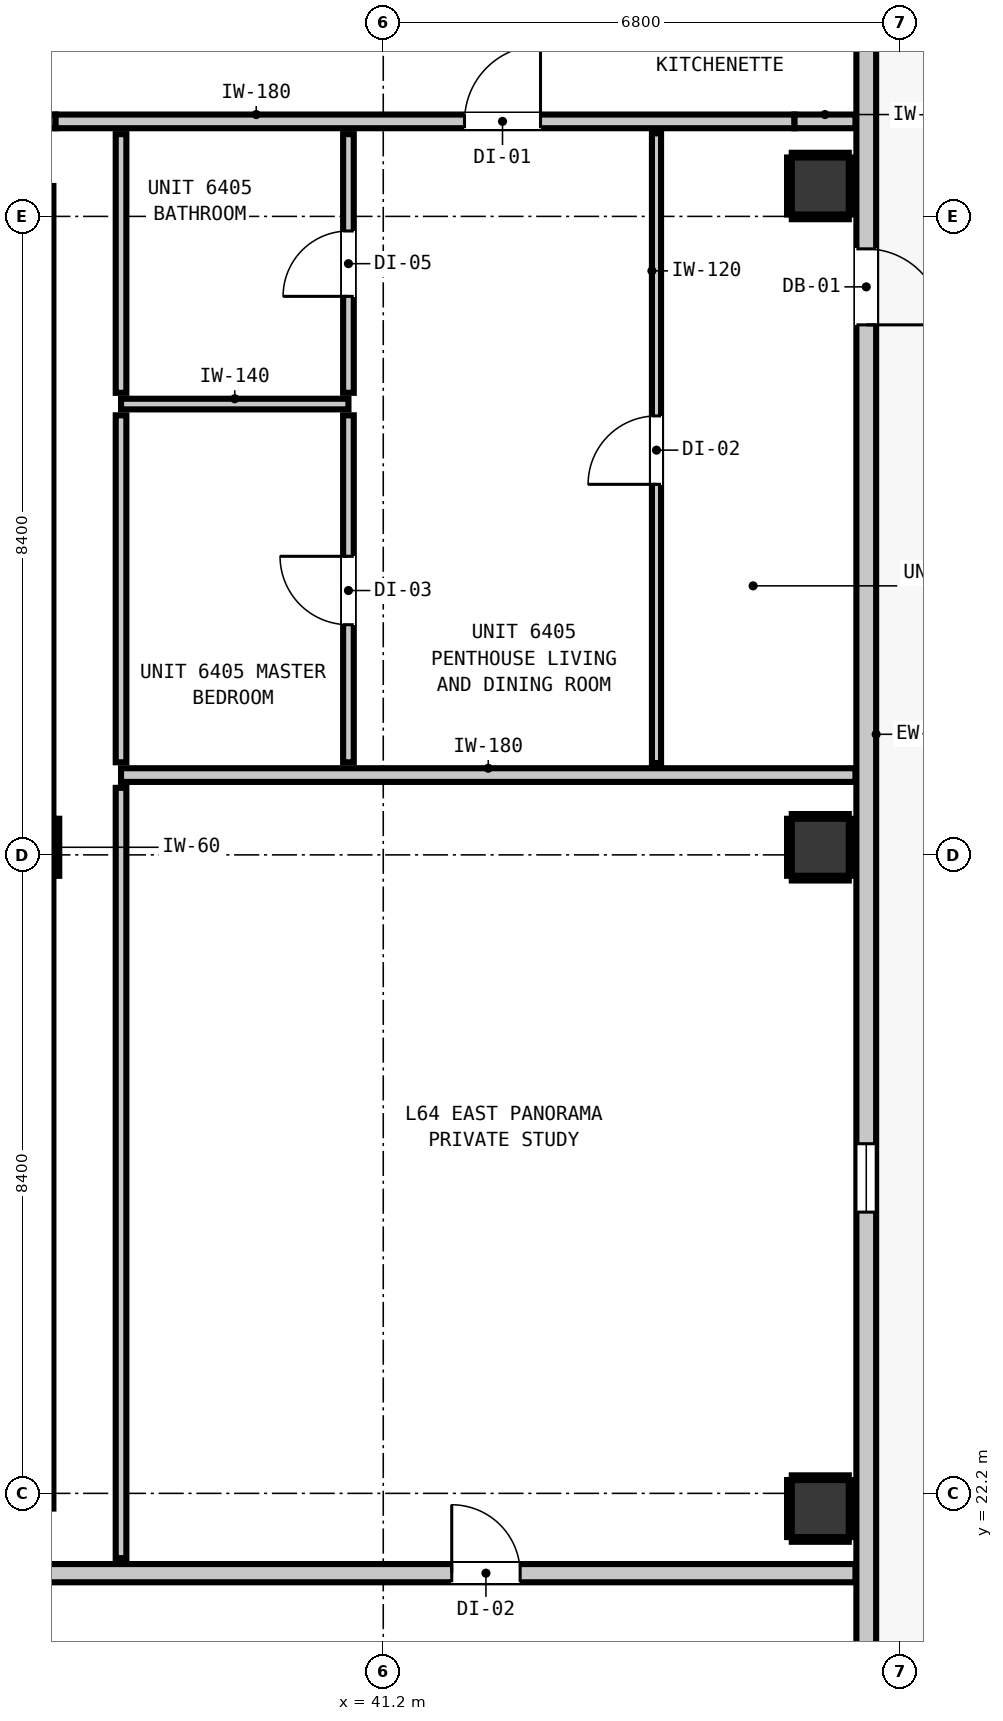
"""IFC4 building model, lengths in metres.
Left out: names, types, materials, properties, quantities, classifications, styles, units other than length and angle.
Written with IfcOpenShell. Run it as: python <this file> out.ifc"""

import sys

from ifc_helpers import new_model, si_unit, direction, frame, frame_2d, origin, origin_2d, place, context, subcontext, project, spatial, rectangle, extrude, element, fill, save


model = new_model("IFC4")
c1 = context("Model", 3, precision=1e-05, world=origin(), true_north=direction((0.0, 1.0)))
c2 = subcontext(c1, "Body", "Model", "MODEL_VIEW")
j1 = project(units=[si_unit("LENGTHUNIT", "METRE"), si_unit("PLANEANGLEUNIT", "RADIAN")], contexts=[c1])
p1 = place(None, origin())
s1 = spatial("IfcSite", under=j1, at=p1, CompositionType="ELEMENT")
p2 = place(p1, origin())
s2 = spatial("IfcBuilding", under=s1, at=p2, CompositionType="ELEMENT")
p3 = place(p2, frame((0.0, 0.0, 220.04)))
s3 = spatial("IfcBuildingStorey", under=s2, at=p3, CompositionType="ELEMENT", Elevation=220.04)
p4 = place(p3, frame((36.5, 30.7, 0.0), z_axis=(0.0, 0.0, 1.0), x_axis=(1.0, 0.0, 0.0)))
e1 = element("IfcColumn", 1, at=p4, inside=s3, PredefinedType="COLUMN", context=c2, shape_type="SweptSolid", body=[
    extrude(rectangle(XDim=0.75, YDim=0.75, at=origin_2d()), origin(), (0.0, 0.0, 1.0), 3.32),
])
p5 = place(p3, frame((36.46, 22.0, 0.0), z_axis=(0.0, 0.0, 1.0), x_axis=(0.0, 1.0, 0.0)))
e2 = element("IfcWall", 2, at=p5, inside=s3, PredefinedType="SHEAR", context=c2, shape_type="SweptSolid", body=[
    extrude(rectangle(XDim=8.32, YDim=0.8, at=frame_2d((4.16, 0.0))), origin(), (0.0, 0.0, 1.0), 3.32),
])
p6 = place(p3, frame((36.46, 31.08, 0.0), z_axis=(0.0, 0.0, 1.0), x_axis=(0.0, 1.0, 0.0)))
e3 = element("IfcWall", 3, at=p6, inside=s3, PredefinedType="SHEAR", context=c2, shape_type="SweptSolid", body=[
    extrude(rectangle(XDim=8.32, YDim=0.8, at=frame_2d((4.16, 0.0))), origin(), (0.0, 0.0, 1.0), 3.32),
])
for number, where, z_axis, x_axis in (
    (4, (46.95, 22.0, 0.0), (0.0, 0.0, 1.0), (1.0, 0.0, 0.0)),
    (5, (46.95, 30.7, 0.0), (0.0, 0.0, 1.0), (1.0, 0.0, 0.0)),
    (6, (46.95, 39.4, 0.0), (0.0, 0.0, 1.0), (1.0, 0.0, 0.0)),
):
    element("IfcColumn", number, at=place(p3, frame(where, z_axis=z_axis, x_axis=x_axis)), inside=s3, PredefinedType="COLUMN", context=c2, shape_type="SweptSolid", body=[
        extrude(rectangle(XDim=0.75, YDim=0.75, at=origin_2d()), origin(), (0.0, 0.0, 1.0), 3.32),
    ])
p7 = place(p3, frame((47.555, 42.655, 0.0), z_axis=(0.0, 0.0, 1.0), x_axis=(0.0, -1.0, 0.0)))
e7 = element("IfcWall", 7, at=p7, inside=s3, PredefinedType="STANDARD", context=c2, shape_type="SweptSolid", body=[
    extrude(rectangle(XDim=30.31, YDim=0.26, at=frame_2d((15.155, 0.0))), origin(), (0.0, 0.0, 1.0), 3.1),
])
p8 = place(p7, frame((4.082, 0.0, 0.0)))
e8 = element("IfcOpeningElement", 8, at=p8, cuts=e7, PredefinedType="OPENING", context=c2, shape_type="SweptSolid", body=[
    extrude(rectangle(XDim=1.0, YDim=2.15, at=frame_2d((0.5, 1.075))), frame((0.0, 0.14, 0.0), z_axis=(0.0, -1.0, 0.0), x_axis=(1.0, 0.0, 0.0)), (0.0, 0.0, 1.0), 0.28),
])
p9 = place(p7, frame((24.701, 0.0, 0.85)))
e9 = element("IfcOpeningElement", 9, at=p9, cuts=e7, PredefinedType="OPENING", context=c2, shape_type="SweptSolid", body=[
    extrude(rectangle(XDim=0.9, YDim=1.5, at=frame_2d((0.45, 0.75))), frame((0.0, 0.14, 0.0), z_axis=(0.0, -1.0, 0.0), x_axis=(1.0, 0.0, 0.0)), (0.0, 0.0, 1.0), 0.28),
])
p10 = place(p7, frame((28.258, 0.0, 0.85)))
e10 = element("IfcOpeningElement", 10, at=p10, cuts=e7, PredefinedType="OPENING", context=c2, shape_type="SweptSolid", body=[
    extrude(rectangle(XDim=0.9, YDim=1.5, at=frame_2d((0.45, 0.75))), frame((0.0, 0.14, 0.0), z_axis=(0.0, -1.0, 0.0), x_axis=(1.0, 0.0, 0.0)), (0.0, 0.0, 1.0), 0.28),
])
p11 = place(p7, frame((15.855, 0.0, 0.85)))
e11 = element("IfcOpeningElement", 11, at=p11, cuts=e7, PredefinedType="OPENING", context=c2, shape_type="SweptSolid", body=[
    extrude(rectangle(XDim=0.9, YDim=1.5, at=frame_2d((0.45, 0.75))), frame((0.0, 0.14, 0.0), z_axis=(0.0, -1.0, 0.0), x_axis=(1.0, 0.0, 0.0)), (0.0, 0.0, 1.0), 0.28),
])
p12 = place(p3, frame((10.787, 21.15, 0.0), z_axis=(0.0, 0.0, 1.0), x_axis=(1.0, 0.0, 0.0)))
e12 = element("IfcWall", 12, at=p12, inside=s3, PredefinedType="PARTITIONING", context=c2, shape_type="SweptSolid", body=[
    extrude(rectangle(XDim=36.626, YDim=0.24, at=frame_2d((18.313, 0.0))), origin(), (0.0, 0.0, 1.0), 3.1),
])
p13 = place(p12, frame((7.423, 0.0, 0.0)))
e13 = element("IfcOpeningElement", 13, at=p13, cuts=e12, PredefinedType="OPENING", context=c2, shape_type="SweptSolid", body=[
    extrude(rectangle(XDim=1.1, YDim=2.15, at=frame_2d((0.55, 1.075))), frame((0.0, 0.13, 0.0), z_axis=(0.0, -1.0, 0.0), x_axis=(1.0, 0.0, 0.0)), (0.0, 0.0, 1.0), 0.26),
])
p14 = place(p12, frame((31.314, 0.0, 0.0)))
e14 = element("IfcOpeningElement", 14, at=p14, cuts=e12, PredefinedType="OPENING", context=c2, shape_type="SweptSolid", body=[
    extrude(rectangle(XDim=0.9, YDim=2.1, at=frame_2d((0.45, 1.05))), frame((0.0, 0.13, 0.0), z_axis=(0.0, -1.0, 0.0), x_axis=(1.0, 0.0, 0.0)), (0.0, 0.0, 1.0), 0.26),
])
p15 = place(p3, frame((37.75, 31.65, 0.0), z_axis=(0.0, 0.0, 1.0), x_axis=(1.0, 0.0, 0.0)))
e15 = element("IfcWall", 15, at=p15, inside=s3, PredefinedType="PARTITIONING", context=c2, shape_type="SweptSolid", body=[
    extrude(rectangle(XDim=9.663, YDim=0.18, at=frame_2d((4.832, 0.0))), origin(), (0.0, 0.0, 1.0), 3.1),
])
p16 = place(p3, frame((10.787, 40.25, 0.0), z_axis=(0.0, 0.0, 1.0), x_axis=(1.0, 0.0, 0.0)))
e16 = element("IfcWall", 16, at=p16, inside=s3, PredefinedType="PARTITIONING", context=c2, shape_type="SweptSolid", body=[
    extrude(rectangle(XDim=26.102, YDim=0.18, at=frame_2d((13.051, 0.0))), origin(), (0.0, 0.0, 1.0), 3.1),
])
p17 = place(p16, frame((6.648, 0.0, 0.0)))
e17 = element("IfcOpeningElement", 17, at=p17, cuts=e16, PredefinedType="OPENING", context=c2, shape_type="SweptSolid", body=[
    extrude(rectangle(XDim=1.4, YDim=2.15, at=frame_2d((0.7, 1.075))), frame((0.0, 0.1, 0.0), z_axis=(0.0, -1.0, 0.0), x_axis=(1.0, 0.0, 0.0)), (0.0, 0.0, 1.0), 0.2),
])
p18 = place(p3, frame((36.889, 40.25, 0.0), z_axis=(0.0, 0.0, 1.0), x_axis=(1.0, 0.0, 0.0)))
e18 = element("IfcWall", 18, at=p18, inside=s3, PredefinedType="PARTITIONING", context=c2, shape_type="SweptSolid", body=[
    extrude(rectangle(XDim=9.722, YDim=0.18, at=frame_2d((4.861, 0.0))), origin(), (0.0, 0.0, 1.0), 2.477),
])
p19 = place(p18, frame((5.38, 0.0, 0.0)))
e19 = element("IfcOpeningElement", 19, at=p19, cuts=e18, PredefinedType="OPENING", context=c2, shape_type="SweptSolid", body=[
    extrude(rectangle(XDim=1.0, YDim=2.15, at=frame_2d((0.5, 1.075))), frame((0.0, 0.1, 0.0), z_axis=(0.0, -1.0, 0.0), x_axis=(1.0, 0.0, 0.0)), (0.0, 0.0, 1.0), 0.2),
])
p20 = place(p3, frame((46.611, 40.25, 0.0), z_axis=(0.0, 0.0, 1.0), x_axis=(1.0, 0.0, 0.0)))
e20 = element("IfcWall", 20, at=p20, inside=s3, PredefinedType="PARTITIONING", context=c2, shape_type="SweptSolid", body=[
    extrude(rectangle(XDim=0.802, YDim=0.18, at=frame_2d((0.401, 0.0))), origin(), (0.0, 0.0, 1.0), 3.1),
])
p21 = place(p3, frame((37.75, 36.531, 0.0), z_axis=(0.0, 0.0, 1.0), x_axis=(1.0, 0.0, 0.0)))
e21 = element("IfcWall", 21, at=p21, inside=s3, PredefinedType="PARTITIONING", context=c2, shape_type="SweptSolid", body=[
    extrude(rectangle(XDim=2.992, YDim=0.14, at=frame_2d((1.496, 0.0))), origin(), (0.0, 0.0, 1.0), 3.1),
])
p22 = place(p3, frame((37.75, 21.348, 0.0), z_axis=(0.0, 0.0, 1.0), x_axis=(0.0, 1.0, 0.0)))
e22 = element("IfcWall", 22, at=p22, inside=s3, PredefinedType="PARTITIONING", context=c2, shape_type="SweptSolid", body=[
    extrude(rectangle(XDim=10.134, YDim=0.14, at=frame_2d((5.067, 0.0))), origin(), (0.0, 0.0, 1.0), 3.1),
])
p23 = place(p3, frame((37.75, 31.818, 0.0), z_axis=(0.0, 0.0, 1.0), x_axis=(0.0, 1.0, 0.0)))
e23 = element("IfcWall", 23, at=p23, inside=s3, PredefinedType="PARTITIONING", context=c2, shape_type="SweptSolid", body=[
    extrude(rectangle(XDim=4.565, YDim=0.14, at=frame_2d((2.282, 0.0))), origin(), (0.0, 0.0, 1.0), 3.1),
])
p24 = place(p3, frame((37.75, 36.679, 0.0), z_axis=(0.0, 0.0, 1.0), x_axis=(0.0, 1.0, 0.0)))
e24 = element("IfcWall", 24, at=p24, inside=s3, PredefinedType="PARTITIONING", context=c2, shape_type="SweptSolid", body=[
    extrude(rectangle(XDim=3.403, YDim=0.14, at=frame_2d((1.702, 0.0))), origin(), (0.0, 0.0, 1.0), 3.1),
])
p25 = place(p3, frame((40.742, 31.818, 0.0), z_axis=(0.0, 0.0, 1.0), x_axis=(0.0, 1.0, 0.0)))
e25 = element("IfcWall", 25, at=p25, inside=s3, PredefinedType="PARTITIONING", context=c2, shape_type="SweptSolid", body=[
    extrude(rectangle(XDim=4.565, YDim=0.14, at=frame_2d((2.282, 0.0))), origin(), (0.0, 0.0, 1.0), 3.1),
])
p26 = place(p25, frame((1.81, 0.0, 0.0)))
e26 = element("IfcOpeningElement", 26, at=p26, cuts=e25, PredefinedType="OPENING", context=c2, shape_type="SweptSolid", body=[
    extrude(rectangle(XDim=0.9, YDim=2.1, at=frame_2d((0.45, 1.05))), frame((0.0, 0.08, 0.0), z_axis=(0.0, -1.0, 0.0), x_axis=(1.0, 0.0, 0.0)), (0.0, 0.0, 1.0), 0.16),
])
p27 = place(p3, frame((40.742, 36.679, 0.0), z_axis=(0.0, 0.0, 1.0), x_axis=(0.0, 1.0, 0.0)))
e27 = element("IfcWall", 27, at=p27, inside=s3, PredefinedType="PARTITIONING", context=c2, shape_type="SweptSolid", body=[
    extrude(rectangle(XDim=3.403, YDim=0.14, at=frame_2d((1.702, 0.0))), origin(), (0.0, 0.0, 1.0), 3.1),
])
p28 = place(p27, frame((1.269, 0.0, 0.0)))
e28 = element("IfcOpeningElement", 28, at=p28, cuts=e27, PredefinedType="OPENING", context=c2, shape_type="SweptSolid", body=[
    extrude(rectangle(XDim=0.86, YDim=2.02, at=frame_2d((0.43, 1.01))), frame((0.0, 0.08, 0.0), z_axis=(0.0, -1.0, 0.0), x_axis=(1.0, 0.0, 0.0)), (0.0, 0.0, 1.0), 0.16),
])
p29 = place(p3, frame((44.795, 31.808, 0.0), z_axis=(0.0, 0.0, 1.0), x_axis=(0.0, 1.0, 0.0)))
e29 = element("IfcWall", 29, at=p29, inside=s3, PredefinedType="PARTITIONING", context=c2, shape_type="SweptSolid", body=[
    extrude(rectangle(XDim=8.284, YDim=0.12, at=frame_2d((4.142, 0.0))), origin(), (0.0, 0.0, 1.0), 3.1),
])
p30 = place(p29, frame((3.667, 0.0, 0.0)))
e30 = element("IfcOpeningElement", 30, at=p30, cuts=e29, PredefinedType="OPENING", context=c2, shape_type="SweptSolid", body=[
    extrude(rectangle(XDim=0.9, YDim=2.1, at=frame_2d((0.45, 1.05))), frame((0.0, 0.07, 0.0), z_axis=(0.0, -1.0, 0.0), x_axis=(1.0, 0.0, 0.0)), (0.0, 0.0, 1.0), 0.14),
])
for number, where, z_axis, x_axis in (
    (31, (36.907, 30.325, 0.0), (0.0, 0.0, 1.0), (0.0, 1.0, 0.0)),
    (32, (46.575, 21.593, 0.0), (0.0, 0.0, 1.0), (1.0, 0.0, 0.0)),
    (33, (46.575, 22.407, 0.0), (0.0, 0.0, 1.0), (1.0, 0.0, 0.0)),
    (34, (46.543, 21.625, 0.0), (0.0, 0.0, 1.0), (0.0, 1.0, 0.0)),
    (35, (47.357, 21.625, 0.0), (0.0, 0.0, 1.0), (0.0, 1.0, 0.0)),
    (36, (46.575, 30.293, 0.0), (0.0, 0.0, 1.0), (1.0, 0.0, 0.0)),
    (37, (46.575, 31.107, 0.0), (0.0, 0.0, 1.0), (1.0, 0.0, 0.0)),
    (38, (46.543, 30.325, 0.0), (0.0, 0.0, 1.0), (0.0, 1.0, 0.0)),
    (39, (47.357, 30.325, 0.0), (0.0, 0.0, 1.0), (0.0, 1.0, 0.0)),
    (40, (46.575, 38.993, 0.0), (0.0, 0.0, 1.0), (1.0, 0.0, 0.0)),
    (41, (46.575, 39.807, 0.0), (0.0, 0.0, 1.0), (1.0, 0.0, 0.0)),
    (42, (46.543, 39.025, 0.0), (0.0, 0.0, 1.0), (0.0, 1.0, 0.0)),
    (43, (47.357, 39.025, 0.0), (0.0, 0.0, 1.0), (0.0, 1.0, 0.0)),
):
    element("IfcWall", number, at=place(p3, frame(where, z_axis=z_axis, x_axis=x_axis)), inside=s3, PredefinedType="PARTITIONING", context=c2, shape_type="SweptSolid", body=[
        extrude(rectangle(XDim=0.75, YDim=0.06, at=frame_2d((0.375, 0.0))), origin(), (0.0, 0.0, 1.0), 1.45),
    ])
p31 = place(p8, origin())
e44 = element("IfcDoor", 44, at=p31, inside=s3, OperationType="SINGLE_SWING_RIGHT", PredefinedType="DOOR", context=c2, shape_type="SweptSolid", body=[
    extrude(rectangle(XDim=1.0, YDim=2.15, at=frame_2d((0.5, 1.075))), frame((0.0, 0.025, 0.0), z_axis=(0.0, -1.0, 0.0), x_axis=(1.0, 0.0, 0.0)), (0.0, 0.0, 1.0), 0.05),
])
fill(e8, e44)
p32 = place(p11, origin())
e45 = element("IfcWindow", 45, at=p32, inside=s3, PartitioningType="SINGLE_PANEL", PredefinedType="WINDOW", context=c2, shape_type="SweptSolid", body=[
    extrude(rectangle(XDim=0.9, YDim=1.5, at=frame_2d((0.45, 0.75))), frame((0.0, 0.03, 0.0), z_axis=(0.0, -1.0, 0.0), x_axis=(1.0, 0.0, 0.0)), (0.0, 0.0, 1.0), 0.06),
])
fill(e11, e45)
p33 = place(p14, origin())
e46 = element("IfcDoor", 46, at=p33, inside=s3, OperationType="SINGLE_SWING_LEFT", PredefinedType="DOOR", context=c2, shape_type="SweptSolid", body=[
    extrude(rectangle(XDim=0.9, YDim=2.1, at=frame_2d((0.45, 1.05))), frame((0.0, 0.025, 0.0), z_axis=(0.0, -1.0, 0.0), x_axis=(1.0, 0.0, 0.0)), (0.0, 0.0, 1.0), 0.05),
])
fill(e14, e46)
p34 = place(p19, origin())
e47 = element("IfcDoor", 47, at=p34, inside=s3, OperationType="SINGLE_SWING_RIGHT", PredefinedType="DOOR", context=c2, shape_type="SweptSolid", body=[
    extrude(rectangle(XDim=1.0, YDim=2.15, at=frame_2d((0.5, 1.075))), frame((0.0, 0.025, 0.0), z_axis=(0.0, -1.0, 0.0), x_axis=(1.0, 0.0, 0.0)), (0.0, 0.0, 1.0), 0.05),
])
fill(e19, e47)
p35 = place(p28, origin())
e48 = element("IfcDoor", 48, at=p35, inside=s3, OperationType="SINGLE_SWING_LEFT", PredefinedType="DOOR", context=c2, shape_type="SweptSolid", body=[
    extrude(rectangle(XDim=0.86, YDim=2.02, at=frame_2d((0.43, 1.01))), frame((0.0, 0.025, 0.0), z_axis=(0.0, -1.0, 0.0), x_axis=(1.0, 0.0, 0.0)), (0.0, 0.0, 1.0), 0.05),
])
fill(e28, e48)
p36 = place(p26, origin())
e49 = element("IfcDoor", 49, at=p36, inside=s3, OperationType="SINGLE_SWING_RIGHT", PredefinedType="DOOR", context=c2, shape_type="SweptSolid", body=[
    extrude(rectangle(XDim=0.9, YDim=2.1, at=frame_2d((0.45, 1.05))), frame((0.0, 0.025, 0.0), z_axis=(0.0, -1.0, 0.0), x_axis=(1.0, 0.0, 0.0)), (0.0, 0.0, 1.0), 0.05),
])
fill(e26, e49)
p37 = place(p30, origin())
e50 = element("IfcDoor", 50, at=p37, inside=s3, OperationType="SINGLE_SWING_LEFT", PredefinedType="DOOR", context=c2, shape_type="SweptSolid", body=[
    extrude(rectangle(XDim=0.9, YDim=2.1, at=frame_2d((0.45, 1.05))), frame((0.0, 0.025, 0.0), z_axis=(0.0, -1.0, 0.0), x_axis=(1.0, 0.0, 0.0)), (0.0, 0.0, 1.0), 0.05),
])
fill(e30, e50)
save(model, sys.argv[1])
